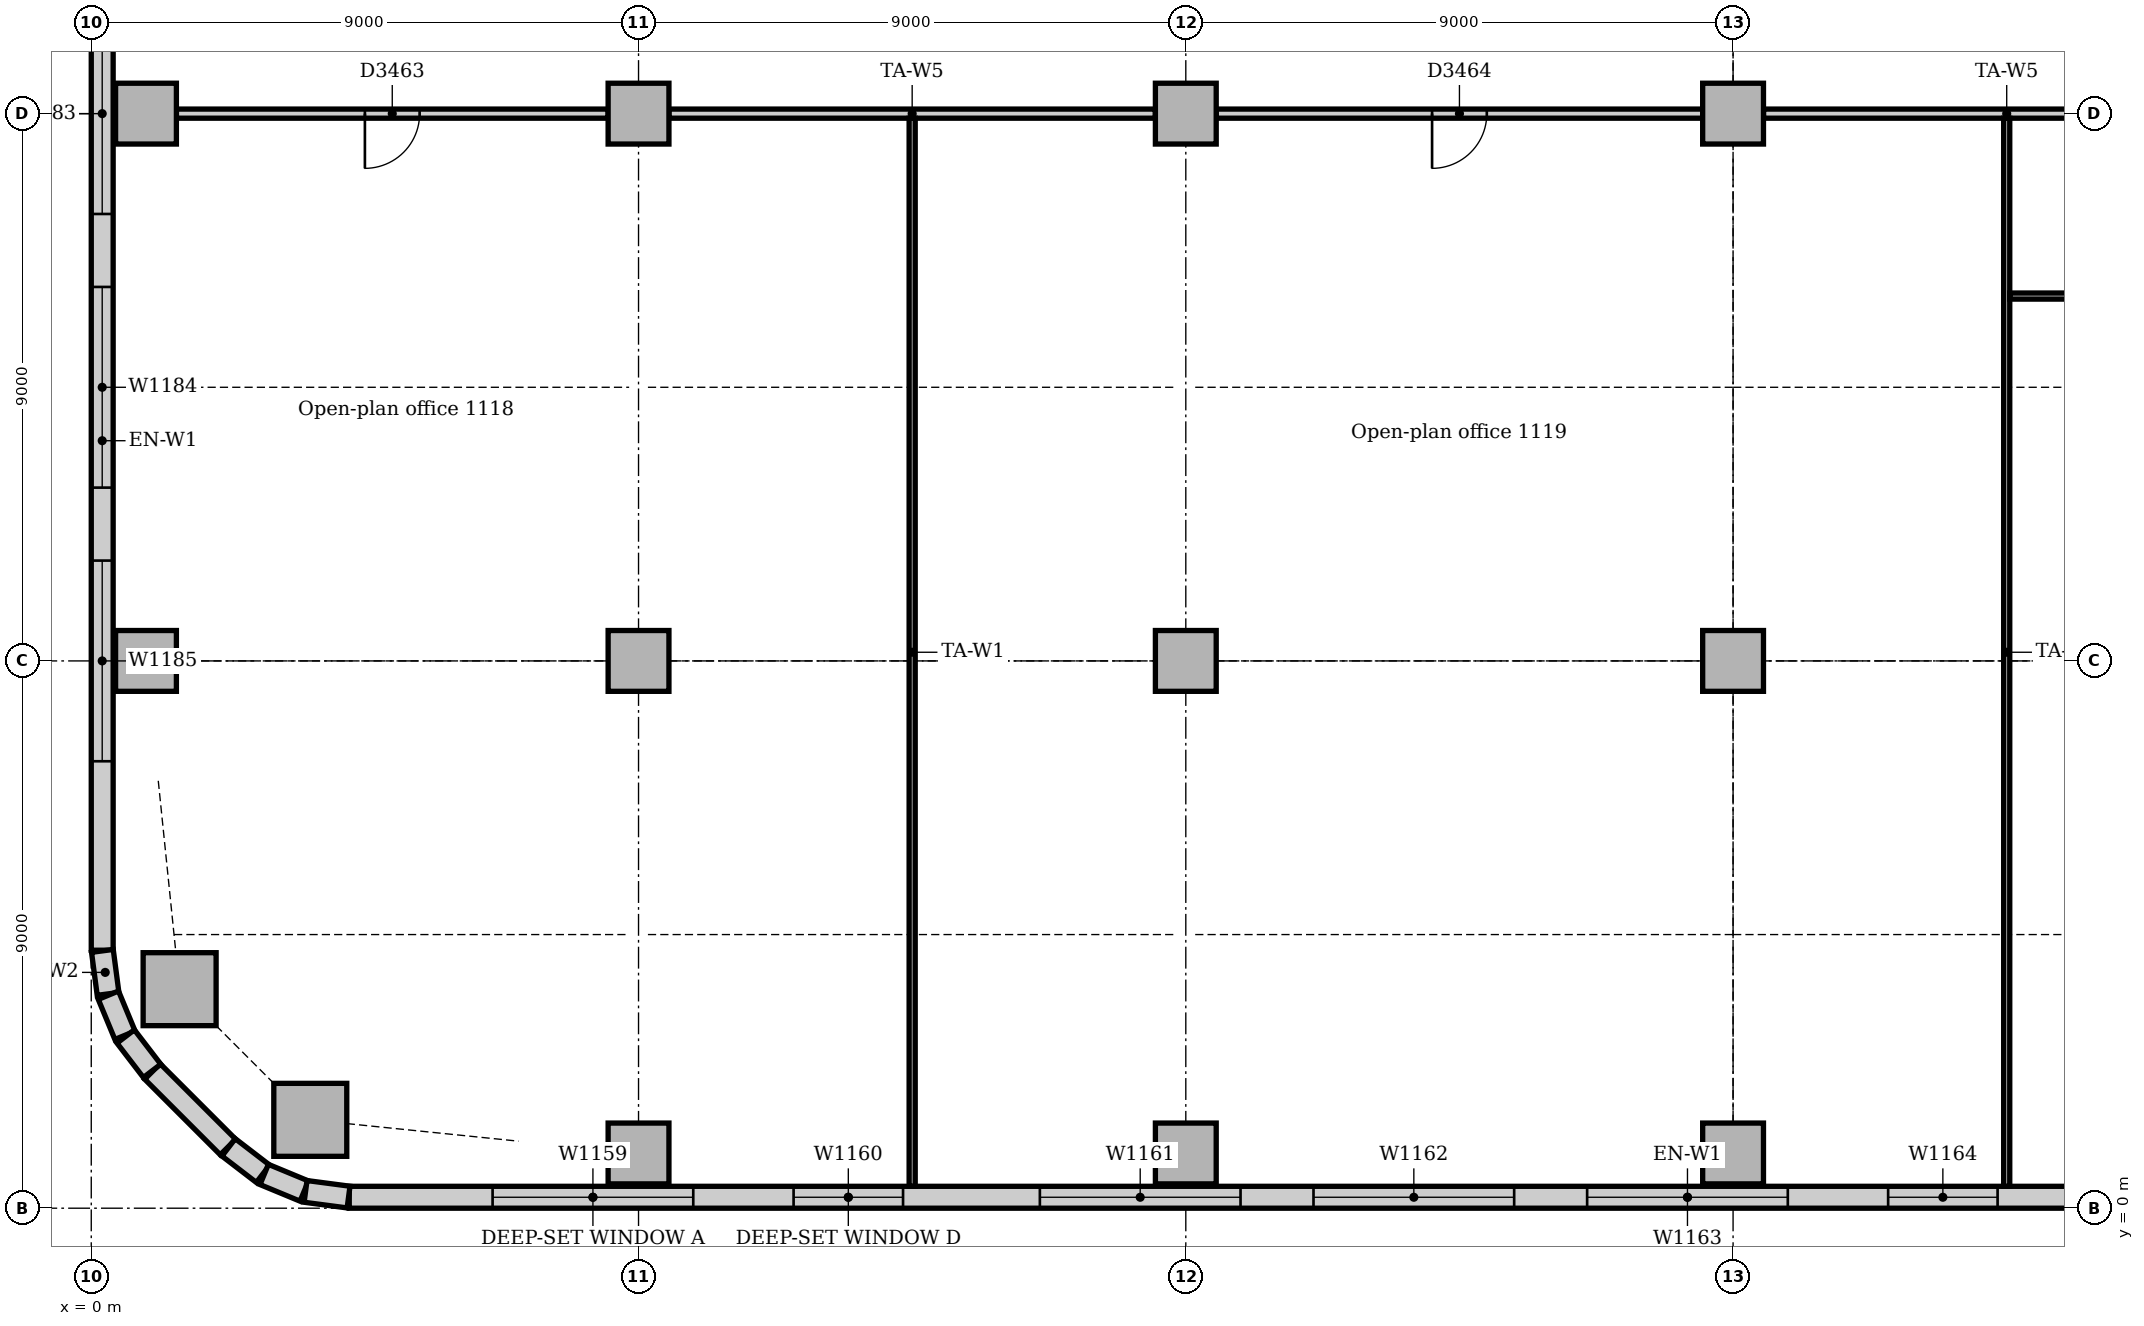
"""IFC4 building model, lengths in metres.
Left out: names, types, materials, properties, quantities, classifications, styles, units other than length and angle.
Written with IfcOpenShell. Run it as: python <this file> out.ifc"""

import sys

from ifc_helpers import new_model, si_unit, direction, frame, frame_2d, origin, origin_2d, place, context, subcontext, project, spatial, rectangle, extrude, element, fill, save


model = new_model("IFC4")
c1 = context("Model", 3, precision=1e-05, world=origin(), true_north=direction((0.0, 1.0)))
c2 = subcontext(c1, "Body", "Model", "MODEL_VIEW")
j1 = project(units=[si_unit("LENGTHUNIT", "METRE"), si_unit("PLANEANGLEUNIT", "RADIAN")], contexts=[c1])
p1 = place(None, origin())
s1 = spatial("IfcSite", under=j1, at=p1, CompositionType="ELEMENT")
p2 = place(p1, origin())
s2 = spatial("IfcBuilding", under=s1, at=p2, CompositionType="ELEMENT")
p3 = place(p2, frame((0.0, 0.0, 51.0)))
s3 = spatial("IfcBuildingStorey", under=s2, at=p3, CompositionType="ELEMENT", Elevation=51.0)
for number, where, z_axis, x_axis in (
    (1, (3.602, 1.453, 0.0), (0.0, 0.0, 1.0), (1.0, 0.0, 0.0)),
    (2, (1.453, 3.602, 0.0), (0.0, 0.0, 1.0), (1.0, 0.0, 0.0)),
):
    element("IfcColumn", number, at=place(p3, frame(where, z_axis=z_axis, x_axis=x_axis)), inside=s3, PredefinedType="COLUMN", context=c2, shape_type="SweptSolid", body=[
        extrude(rectangle(XDim=1.2, YDim=1.2, at=origin_2d()), origin(), (0.0, 0.0, 1.0), 3.85),
    ])
for number, where, z_axis, x_axis in (
    (3, (9.0, 0.9, 0.0), (0.0, 0.0, 1.0), (1.0, 0.0, 0.0)),
    (4, (18.0, 0.9, 0.0), (0.0, 0.0, 1.0), (1.0, 0.0, 0.0)),
    (5, (27.0, 0.9, 0.0), (0.0, 0.0, 1.0), (1.0, 0.0, 0.0)),
    (6, (0.9, 9.0, 0.0), (0.0, 0.0, 1.0), (1.0, 0.0, 0.0)),
    (7, (0.9, 18.0, 0.0), (0.0, 0.0, 1.0), (1.0, 0.0, 0.0)),
    (8, (9.0, 9.0, 0.0), (0.0, 0.0, 1.0), (1.0, 0.0, 0.0)),
    (9, (9.0, 18.0, 0.0), (0.0, 0.0, 1.0), (1.0, 0.0, 0.0)),
    (10, (18.0, 9.0, 0.0), (0.0, 0.0, 1.0), (1.0, 0.0, 0.0)),
    (11, (18.0, 18.0, 0.0), (0.0, 0.0, 1.0), (1.0, 0.0, 0.0)),
    (12, (27.0, 9.0, 0.0), (0.0, 0.0, 1.0), (1.0, 0.0, 0.0)),
    (13, (27.0, 18.0, 0.0), (0.0, 0.0, 1.0), (1.0, 0.0, 0.0)),
):
    element("IfcColumn", number, at=place(p3, frame(where, z_axis=z_axis, x_axis=x_axis)), inside=s3, PredefinedType="COLUMN", context=c2, shape_type="SweptSolid", body=[
        extrude(rectangle(XDim=1.0, YDim=1.0, at=origin_2d()), origin(), (0.0, 0.0, 1.0), 3.85),
    ])
p4 = place(p3, frame((4.243, 0.18, 0.0), z_axis=(0.0, 0.0, 1.0), x_axis=(1.0, 0.0, 0.0)))
e14 = element("IfcWall", 14, at=p4, inside=s3, PredefinedType="STANDARD", context=c2, shape_type="SweptSolid", body=[
    extrude(rectangle(XDim=44.015, YDim=0.36, at=frame_2d((22.007, 0.0))), origin(), (0.0, 0.0, 1.0), 3.85),
])
p5 = place(p4, frame((2.357, 0.0, 0.9)))
e15 = element("IfcOpeningElement", 15, at=p5, cuts=e14, PredefinedType="OPENING", context=c2, shape_type="SweptSolid", body=[
    extrude(rectangle(XDim=3.3, YDim=1.6, at=frame_2d((1.65, 0.8))), frame((0.0, 0.19, 0.0), z_axis=(0.0, -1.0, 0.0), x_axis=(1.0, 0.0, 0.0)), (0.0, 0.0, 1.0), 0.38),
])
p6 = place(p4, frame((7.307, 0.0, 0.9)))
e16 = element("IfcOpeningElement", 16, at=p6, cuts=e14, PredefinedType="OPENING", context=c2, shape_type="SweptSolid", body=[
    extrude(rectangle(XDim=1.8, YDim=1.6, at=frame_2d((0.9, 0.8))), frame((0.0, 0.19, 0.0), z_axis=(0.0, -1.0, 0.0), x_axis=(1.0, 0.0, 0.0)), (0.0, 0.0, 1.0), 0.38),
])
p7 = place(p4, frame((11.357, 0.0, 0.9)))
e17 = element("IfcOpeningElement", 17, at=p7, cuts=e14, PredefinedType="OPENING", context=c2, shape_type="SweptSolid", body=[
    extrude(rectangle(XDim=3.3, YDim=1.6, at=frame_2d((1.65, 0.8))), frame((0.0, 0.19, 0.0), z_axis=(0.0, -1.0, 0.0), x_axis=(1.0, 0.0, 0.0)), (0.0, 0.0, 1.0), 0.38),
])
p8 = place(p4, frame((15.857, 0.0, 0.9)))
e18 = element("IfcOpeningElement", 18, at=p8, cuts=e14, PredefinedType="OPENING", context=c2, shape_type="SweptSolid", body=[
    extrude(rectangle(XDim=3.3, YDim=1.6, at=frame_2d((1.65, 0.8))), frame((0.0, 0.19, 0.0), z_axis=(0.0, -1.0, 0.0), x_axis=(1.0, 0.0, 0.0)), (0.0, 0.0, 1.0), 0.38),
])
p9 = place(p4, frame((20.357, 0.0, 0.9)))
e19 = element("IfcOpeningElement", 19, at=p9, cuts=e14, PredefinedType="OPENING", context=c2, shape_type="SweptSolid", body=[
    extrude(rectangle(XDim=3.3, YDim=1.6, at=frame_2d((1.65, 0.8))), frame((0.0, 0.19, 0.0), z_axis=(0.0, -1.0, 0.0), x_axis=(1.0, 0.0, 0.0)), (0.0, 0.0, 1.0), 0.38),
])
p10 = place(p4, frame((25.307, 0.0, 0.9)))
e20 = element("IfcOpeningElement", 20, at=p10, cuts=e14, PredefinedType="OPENING", context=c2, shape_type="SweptSolid", body=[
    extrude(rectangle(XDim=1.8, YDim=1.6, at=frame_2d((0.9, 0.8))), frame((0.0, 0.19, 0.0), z_axis=(0.0, -1.0, 0.0), x_axis=(1.0, 0.0, 0.0)), (0.0, 0.0, 1.0), 0.38),
])
p11 = place(p4, frame((29.357, 0.0, 0.9)))
e21 = element("IfcOpeningElement", 21, at=p11, cuts=e14, PredefinedType="OPENING", context=c2, shape_type="SweptSolid", body=[
    extrude(rectangle(XDim=3.3, YDim=1.6, at=frame_2d((1.65, 0.8))), frame((0.0, 0.19, 0.0), z_axis=(0.0, -1.0, 0.0), x_axis=(1.0, 0.0, 0.0)), (0.0, 0.0, 1.0), 0.38),
])
p12 = place(p4, frame((33.857, 0.0, 0.9)))
e22 = element("IfcOpeningElement", 22, at=p12, cuts=e14, PredefinedType="OPENING", context=c2, shape_type="SweptSolid", body=[
    extrude(rectangle(XDim=3.3, YDim=1.6, at=frame_2d((1.65, 0.8))), frame((0.0, 0.19, 0.0), z_axis=(0.0, -1.0, 0.0), x_axis=(1.0, 0.0, 0.0)), (0.0, 0.0, 1.0), 0.38),
])
p13 = place(p4, frame((38.357, 0.0, 0.9)))
e23 = element("IfcOpeningElement", 23, at=p13, cuts=e14, PredefinedType="OPENING", context=c2, shape_type="SweptSolid", body=[
    extrude(rectangle(XDim=3.3, YDim=1.6, at=frame_2d((1.65, 0.8))), frame((0.0, 0.19, 0.0), z_axis=(0.0, -1.0, 0.0), x_axis=(1.0, 0.0, 0.0)), (0.0, 0.0, 1.0), 0.38),
])
p14 = place(p3, frame((0.18, 21.0, 0.0), z_axis=(0.0, 0.0, 1.0), x_axis=(0.0, -1.0, 0.0)))
e24 = element("IfcWall", 24, at=p14, inside=s3, PredefinedType="STANDARD", context=c2, shape_type="SweptSolid", body=[
    extrude(rectangle(XDim=16.757, YDim=0.36, at=frame_2d((8.379, 0.0))), origin(), (0.0, 0.0, 1.0), 3.85),
])
p15 = place(p14, frame((1.35, 0.0, 0.9)))
e25 = element("IfcOpeningElement", 25, at=p15, cuts=e24, PredefinedType="OPENING", context=c2, shape_type="SweptSolid", body=[
    extrude(rectangle(XDim=3.3, YDim=1.6, at=frame_2d((1.65, 0.8))), frame((0.0, 0.19, 0.0), z_axis=(0.0, -1.0, 0.0), x_axis=(1.0, 0.0, 0.0)), (0.0, 0.0, 1.0), 0.38),
])
p16 = place(p14, frame((5.85, 0.0, 0.9)))
e26 = element("IfcOpeningElement", 26, at=p16, cuts=e24, PredefinedType="OPENING", context=c2, shape_type="SweptSolid", body=[
    extrude(rectangle(XDim=3.3, YDim=1.6, at=frame_2d((1.65, 0.8))), frame((0.0, 0.19, 0.0), z_axis=(0.0, -1.0, 0.0), x_axis=(1.0, 0.0, 0.0)), (0.0, 0.0, 1.0), 0.38),
])
p17 = place(p14, frame((10.35, 0.0, 0.9)))
e27 = element("IfcOpeningElement", 27, at=p17, cuts=e24, PredefinedType="OPENING", context=c2, shape_type="SweptSolid", body=[
    extrude(rectangle(XDim=3.3, YDim=1.6, at=frame_2d((1.65, 0.8))), frame((0.0, 0.19, 0.0), z_axis=(0.0, -1.0, 0.0), x_axis=(1.0, 0.0, 0.0)), (0.0, 0.0, 1.0), 0.38),
])
p18 = place(p3, frame((1.006, 2.249, 0.0), z_axis=(0.0, 0.0, 1.0), x_axis=(0.707106781187, -0.707106781187, 0.0)))
e28 = element("IfcWall", 28, at=p18, inside=s3, PredefinedType="STANDARD", context=c2, shape_type="SweptSolid", body=[
    extrude(rectangle(XDim=1.757, YDim=0.36, at=frame_2d((0.879, 0.0))), origin(), (0.0, 0.0, 1.0), 3.85),
])
for number, where, z_axis, x_axis in (
    (29, (0.183, 4.231, 0.0), (0.0, 0.0, 1.0), (0.131, -0.991, 0.0)),
    (30, (0.282, 3.503, 0.0), (0.0, 0.0, 1.0), (0.383, -0.924, 0.0)),
):
    element("IfcWall", number, at=place(p3, frame(where, z_axis=z_axis, x_axis=x_axis)), inside=s3, PredefinedType="STANDARD", context=c2, shape_type="SweptSolid", body=[
        extrude(rectangle(XDim=0.713, YDim=0.36, at=frame_2d((0.356, 0.0))), origin(), (0.0, 0.0, 1.0), 3.85),
    ])
for number, where, z_axis, x_axis in (
    (31, (0.566, 2.825, 0.0), (0.0, 0.0, 1.0), (0.609, -0.793, 0.0)),
    (32, (2.259, 1.0, 0.0), (0.0, 0.0, 1.0), (0.793, -0.609, 0.0)),
):
    element("IfcWall", number, at=place(p3, frame(where, z_axis=z_axis, x_axis=x_axis)), inside=s3, PredefinedType="STANDARD", context=c2, shape_type="SweptSolid", body=[
        extrude(rectangle(XDim=0.713, YDim=0.36, at=frame_2d((0.357, 0.0))), origin(), (0.0, 0.0, 1.0), 3.85),
    ])
for number, where, z_axis, x_axis in (
    (33, (2.844, 0.555, 0.0), (0.0, 0.0, 1.0), (0.924, -0.383, 0.0)),
    (34, (3.524, 0.276, 0.0), (0.0, 0.0, 1.0), (0.991, -0.131, 0.0)),
):
    element("IfcWall", number, at=place(p3, frame(where, z_axis=z_axis, x_axis=x_axis)), inside=s3, PredefinedType="STANDARD", context=c2, shape_type="SweptSolid", body=[
        extrude(rectangle(XDim=0.713, YDim=0.36, at=frame_2d((0.356, 0.0))), origin(), (0.0, 0.0, 1.0), 3.85),
    ])
p19 = place(p3, frame((27.5, 18.0, 0.0), z_axis=(0.0, 0.0, 1.0), x_axis=(1.0, 0.0, 0.0)))
e35 = element("IfcWall", 35, at=p19, inside=s3, PredefinedType="PARTITIONING", context=c2, shape_type="SweptSolid", body=[
    extrude(rectangle(XDim=8.0, YDim=0.15, at=frame_2d((4.0, 0.0))), origin(), (0.0, 0.0, 1.0), 3.15),
])
p20 = place(p3, frame((18.5, 18.0, 0.0), z_axis=(0.0, 0.0, 1.0), x_axis=(1.0, 0.0, 0.0)))
e36 = element("IfcWall", 36, at=p20, inside=s3, PredefinedType="PARTITIONING", context=c2, shape_type="SweptSolid", body=[
    extrude(rectangle(XDim=8.0, YDim=0.15, at=frame_2d((4.0, 0.0))), origin(), (0.0, 0.0, 1.0), 3.15),
])
p21 = place(p20, frame((3.55, 0.0, 0.0)))
e37 = element("IfcOpeningElement", 37, at=p21, cuts=e36, PredefinedType="OPENING", context=c2, shape_type="SweptSolid", body=[
    extrude(rectangle(XDim=0.9, YDim=2.1, at=frame_2d((0.45, 1.05))), frame((0.0, 0.085, 0.0), z_axis=(0.0, -1.0, 0.0), x_axis=(1.0, 0.0, 0.0)), (0.0, 0.0, 1.0), 0.17),
])
p22 = place(p3, frame((9.5, 18.0, 0.0), z_axis=(0.0, 0.0, 1.0), x_axis=(1.0, 0.0, 0.0)))
e38 = element("IfcWall", 38, at=p22, inside=s3, PredefinedType="PARTITIONING", context=c2, shape_type="SweptSolid", body=[
    extrude(rectangle(XDim=8.0, YDim=0.15, at=frame_2d((4.0, 0.0))), origin(), (0.0, 0.0, 1.0), 3.15),
])
p23 = place(p3, frame((1.4, 18.0, 0.0), z_axis=(0.0, 0.0, 1.0), x_axis=(1.0, 0.0, 0.0)))
e39 = element("IfcWall", 39, at=p23, inside=s3, PredefinedType="PARTITIONING", context=c2, shape_type="SweptSolid", body=[
    extrude(rectangle(XDim=7.1, YDim=0.15, at=frame_2d((3.55, 0.0))), origin(), (0.0, 0.0, 1.0), 3.15),
])
p24 = place(p23, frame((3.1, 0.0, 0.0)))
e40 = element("IfcOpeningElement", 40, at=p24, cuts=e39, PredefinedType="OPENING", context=c2, shape_type="SweptSolid", body=[
    extrude(rectangle(XDim=0.9, YDim=2.1, at=frame_2d((0.45, 1.05))), frame((0.0, 0.085, 0.0), z_axis=(0.0, -1.0, 0.0), x_axis=(1.0, 0.0, 0.0)), (0.0, 0.0, 1.0), 0.17),
])
for number, where, z_axis, x_axis in (
    (41, (13.5, 0.36, 0.0), (0.0, 0.0, 1.0), (0.0, 1.0, 0.0)),
    (42, (31.5, 0.36, 0.0), (0.0, 0.0, 1.0), (0.0, 1.0, 0.0)),
):
    element("IfcWall", number, at=place(p3, frame(where, z_axis=z_axis, x_axis=x_axis)), inside=s3, PredefinedType="PARTITIONING", context=c2, shape_type="SweptSolid", body=[
        extrude(rectangle(XDim=17.565, YDim=0.1, at=frame_2d((8.783, 0.0))), origin(), (0.0, 0.0, 1.0), 3.85),
    ])
p25 = place(p3, frame((31.55, 15.0, 0.0), z_axis=(0.0, 0.0, 1.0), x_axis=(1.0, 0.0, 0.0)))
e43 = element("IfcWall", 43, at=p25, inside=s3, PredefinedType="PARTITIONING", context=c2, shape_type="SweptSolid", body=[
    extrude(rectangle(XDim=13.4, YDim=0.1, at=frame_2d((6.7, 0.0))), origin(), (0.0, 0.0, 1.0), 3.85),
])
p26 = place(p25, frame((6.25, 0.0, 0.0)))
e44 = element("IfcOpeningElement", 44, at=p26, cuts=e43, PredefinedType="OPENING", context=c2, shape_type="SweptSolid", body=[
    extrude(rectangle(XDim=0.9, YDim=2.1, at=frame_2d((0.45, 1.05))), frame((0.0, 0.06, 0.0), z_axis=(0.0, -1.0, 0.0), x_axis=(1.0, 0.0, 0.0)), (0.0, 0.0, 1.0), 0.12),
])
p27 = place(p5, origin())
e45 = element("IfcWindow", 45, at=p27, inside=s3, PartitioningType="SINGLE_PANEL", PredefinedType="WINDOW", context=c2, shape_type="SweptSolid", body=[
    extrude(rectangle(XDim=3.3, YDim=1.6, at=frame_2d((1.65, 0.8))), frame((0.0, 0.13, 0.0), z_axis=(0.0, -1.0, 0.0), x_axis=(1.0, 0.0, 0.0)), (0.0, 0.0, 1.0), 0.06),
])
fill(e15, e45)
p28 = place(p6, origin())
e46 = element("IfcWindow", 46, at=p28, inside=s3, PartitioningType="SINGLE_PANEL", PredefinedType="WINDOW", context=c2, shape_type="SweptSolid", body=[
    extrude(rectangle(XDim=1.8, YDim=1.6, at=frame_2d((0.9, 0.8))), frame((0.0, 0.13, 0.0), z_axis=(0.0, -1.0, 0.0), x_axis=(1.0, 0.0, 0.0)), (0.0, 0.0, 1.0), 0.06),
])
fill(e16, e46)
p29 = place(p7, origin())
e47 = element("IfcWindow", 47, at=p29, inside=s3, PartitioningType="SINGLE_PANEL", PredefinedType="WINDOW", context=c2, shape_type="SweptSolid", body=[
    extrude(rectangle(XDim=3.3, YDim=1.6, at=frame_2d((1.65, 0.8))), frame((0.0, 0.13, 0.0), z_axis=(0.0, -1.0, 0.0), x_axis=(1.0, 0.0, 0.0)), (0.0, 0.0, 1.0), 0.06),
])
fill(e17, e47)
p30 = place(p8, origin())
e48 = element("IfcWindow", 48, at=p30, inside=s3, PartitioningType="SINGLE_PANEL", PredefinedType="WINDOW", context=c2, shape_type="SweptSolid", body=[
    extrude(rectangle(XDim=3.3, YDim=1.6, at=frame_2d((1.65, 0.8))), frame((0.0, 0.13, 0.0), z_axis=(0.0, -1.0, 0.0), x_axis=(1.0, 0.0, 0.0)), (0.0, 0.0, 1.0), 0.06),
])
fill(e18, e48)
p31 = place(p9, origin())
e49 = element("IfcWindow", 49, at=p31, inside=s3, PartitioningType="SINGLE_PANEL", PredefinedType="WINDOW", context=c2, shape_type="SweptSolid", body=[
    extrude(rectangle(XDim=3.3, YDim=1.6, at=frame_2d((1.65, 0.8))), frame((0.0, 0.13, 0.0), z_axis=(0.0, -1.0, 0.0), x_axis=(1.0, 0.0, 0.0)), (0.0, 0.0, 1.0), 0.06),
])
fill(e19, e49)
p32 = place(p10, origin())
e50 = element("IfcWindow", 50, at=p32, inside=s3, PartitioningType="SINGLE_PANEL", PredefinedType="WINDOW", context=c2, shape_type="SweptSolid", body=[
    extrude(rectangle(XDim=1.8, YDim=1.6, at=frame_2d((0.9, 0.8))), frame((0.0, 0.13, 0.0), z_axis=(0.0, -1.0, 0.0), x_axis=(1.0, 0.0, 0.0)), (0.0, 0.0, 1.0), 0.06),
])
fill(e20, e50)
p33 = place(p15, origin())
e51 = element("IfcWindow", 51, at=p33, inside=s3, PartitioningType="SINGLE_PANEL", PredefinedType="WINDOW", context=c2, shape_type="SweptSolid", body=[
    extrude(rectangle(XDim=3.3, YDim=1.6, at=frame_2d((1.65, 0.8))), frame((0.0, 0.13, 0.0), z_axis=(0.0, -1.0, 0.0), x_axis=(1.0, 0.0, 0.0)), (0.0, 0.0, 1.0), 0.06),
])
fill(e25, e51)
p34 = place(p16, origin())
e52 = element("IfcWindow", 52, at=p34, inside=s3, PartitioningType="SINGLE_PANEL", PredefinedType="WINDOW", context=c2, shape_type="SweptSolid", body=[
    extrude(rectangle(XDim=3.3, YDim=1.6, at=frame_2d((1.65, 0.8))), frame((0.0, 0.13, 0.0), z_axis=(0.0, -1.0, 0.0), x_axis=(1.0, 0.0, 0.0)), (0.0, 0.0, 1.0), 0.06),
])
fill(e26, e52)
p35 = place(p17, origin())
e53 = element("IfcWindow", 53, at=p35, inside=s3, PartitioningType="SINGLE_PANEL", PredefinedType="WINDOW", context=c2, shape_type="SweptSolid", body=[
    extrude(rectangle(XDim=3.3, YDim=1.6, at=frame_2d((1.65, 0.8))), frame((0.0, 0.13, 0.0), z_axis=(0.0, -1.0, 0.0), x_axis=(1.0, 0.0, 0.0)), (0.0, 0.0, 1.0), 0.06),
])
fill(e27, e53)
p36 = place(p24, frame((0.9, 0.0, 0.0), z_axis=(0.0, 0.0, 1.0), x_axis=(-1.0, 0.0, 0.0)))
e54 = element("IfcDoor", 54, at=p36, inside=s3, OperationType="SINGLE_SWING_RIGHT", PredefinedType="DOOR", context=c2, shape_type="SweptSolid", body=[
    extrude(rectangle(XDim=0.9, YDim=2.1, at=frame_2d((0.45, 1.05))), frame((0.0, 0.025, 0.0), z_axis=(0.0, -1.0, 0.0), x_axis=(1.0, 0.0, 0.0)), (0.0, 0.0, 1.0), 0.05),
])
fill(e40, e54)
p37 = place(p21, frame((0.9, 0.0, 0.0), z_axis=(0.0, 0.0, 1.0), x_axis=(-1.0, 0.0, 0.0)))
e55 = element("IfcDoor", 55, at=p37, inside=s3, OperationType="SINGLE_SWING_RIGHT", PredefinedType="DOOR", context=c2, shape_type="SweptSolid", body=[
    extrude(rectangle(XDim=0.9, YDim=2.1, at=frame_2d((0.45, 1.05))), frame((0.0, 0.025, 0.0), z_axis=(0.0, -1.0, 0.0), x_axis=(1.0, 0.0, 0.0)), (0.0, 0.0, 1.0), 0.05),
])
fill(e37, e55)
save(model, sys.argv[1])
